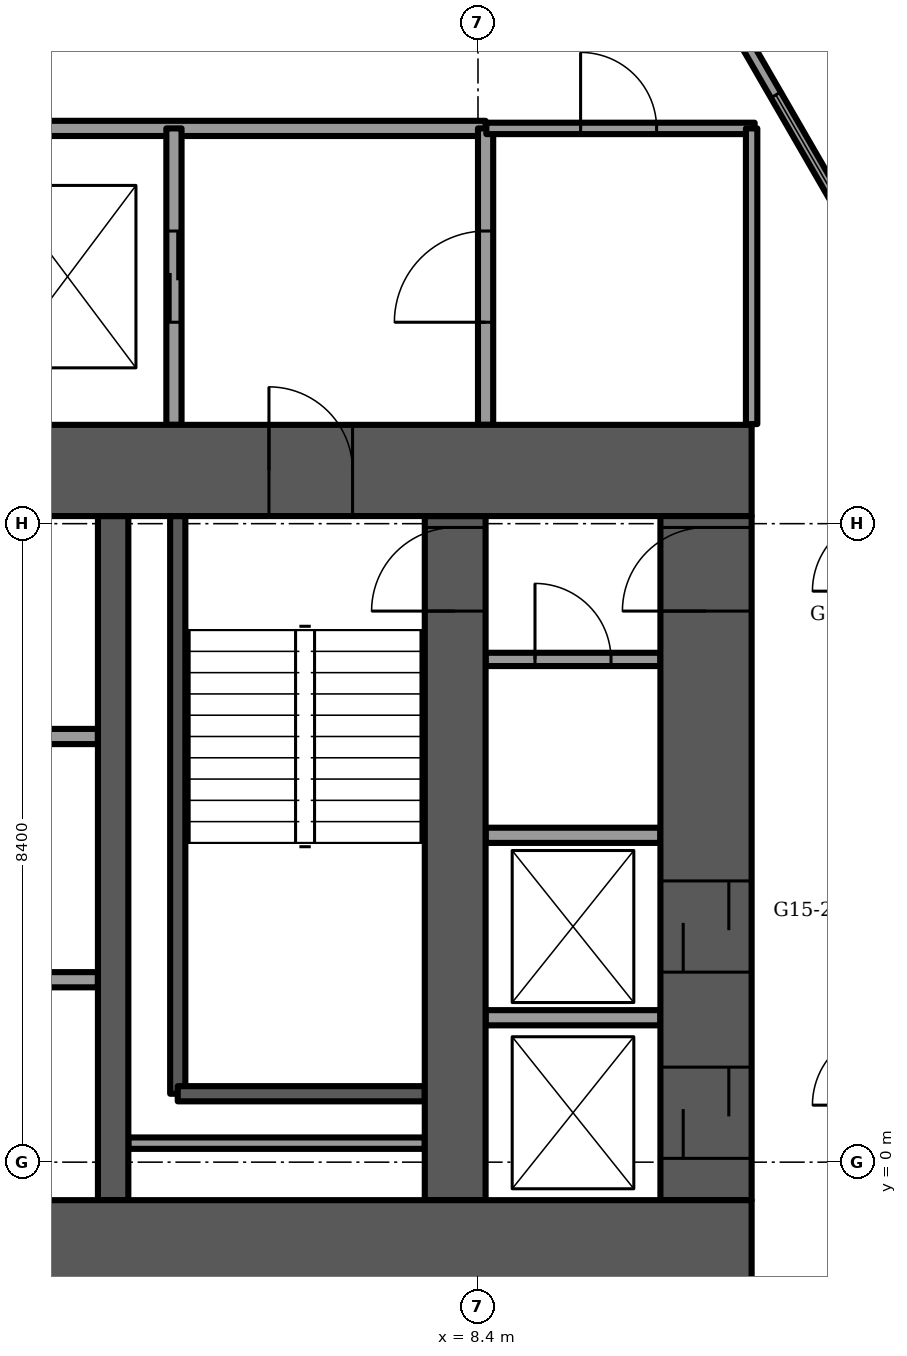
"""IFC4 building model, lengths in metres.
Left out: names, types, materials, properties, quantities, classifications, styles, units other than length and angle.
Written with IfcOpenShell. Run it as: python <this file> out.ifc"""

import sys

from ifc_helpers import new_model, si_unit, direction, frame, frame_2d, origin, place, context, subcontext, project, spatial, rectangle, extrude, element, fill, save


model = new_model("IFC4")
c1 = context("Model", 3, precision=1e-05, world=origin(), true_north=direction((0.0, 1.0)))
c2 = subcontext(c1, "Body", "Model", "MODEL_VIEW")
j1 = project(units=[si_unit("LENGTHUNIT", "METRE"), si_unit("PLANEANGLEUNIT", "RADIAN")], contexts=[c1])
p1 = place(None, origin())
s1 = spatial("IfcSite", under=j1, at=p1, CompositionType="ELEMENT")
p2 = place(p1, origin())
s2 = spatial("IfcBuilding", under=s1, at=p2, CompositionType="ELEMENT")
p3 = place(p2, frame((0.0, 0.0, 61.75)))
s3 = spatial("IfcBuildingStorey", under=s2, at=p3, CompositionType="ELEMENT", Elevation=61.75)
p4 = place(p3, frame((-12.0, -1.1, -0.3), z_axis=(0.0, 0.0, 1.0), x_axis=(1.0, 0.0, 0.0)))
e1 = element("IfcWall", 1, at=p4, inside=s3, PredefinedType="SHEAR", context=c2, shape_type="SweptSolid", body=[
    extrude(rectangle(XDim=24.0, YDim=1.2, at=frame_2d((12.0, 0.0))), origin(), (0.0, 0.0, 1.0), 3.75),
])
p5 = place(p4, frame((11.2, 0.0, 0.0)))
e2 = element("IfcOpeningElement", 2, at=p5, cuts=e1, PredefinedType="OPENING", context=c2, shape_type="SweptSolid", body=[
    extrude(rectangle(XDim=1.6, YDim=2.1, at=frame_2d((0.8, 1.05))), frame((0.0, 0.6, 0.0), z_axis=(0.0, -1.0, 0.0), x_axis=(1.0, 0.0, 0.0)), (0.0, 0.0, 1.0), 1.2),
])
p6 = place(p3, frame((-12.0, 9.1, -0.3), z_axis=(0.0, 0.0, 1.0), x_axis=(1.0, 0.0, 0.0)))
e3 = element("IfcWall", 3, at=p6, inside=s3, PredefinedType="SHEAR", context=c2, shape_type="SweptSolid", body=[
    extrude(rectangle(XDim=24.0, YDim=1.2, at=frame_2d((12.0, 0.0))), origin(), (0.0, 0.0, 1.0), 3.75),
])
p7 = place(p6, frame((11.2, 0.0, 0.0)))
e4 = element("IfcOpeningElement", 4, at=p7, cuts=e3, PredefinedType="OPENING", context=c2, shape_type="SweptSolid", body=[
    extrude(rectangle(XDim=1.6, YDim=2.1, at=frame_2d((0.8, 1.05))), frame((0.0, 0.6, 0.0), z_axis=(0.0, -1.0, 0.0), x_axis=(1.0, 0.0, 0.0)), (0.0, 0.0, 1.0), 1.2),
])
p8 = place(p6, frame((5.25, 0.0, 0.0)))
e5 = element("IfcOpeningElement", 5, at=p8, cuts=e3, PredefinedType="OPENING", context=c2, shape_type="SweptSolid", body=[
    extrude(rectangle(XDim=1.1, YDim=2.1, at=frame_2d((0.55, 1.05))), frame((0.0, 0.6, 0.0), z_axis=(0.0, -1.0, 0.0), x_axis=(1.0, 0.0, 0.0)), (0.0, 0.0, 1.0), 1.2),
])
p9 = place(p6, frame((17.65, 0.0, 0.0)))
e6 = element("IfcOpeningElement", 6, at=p9, cuts=e3, PredefinedType="OPENING", context=c2, shape_type="SweptSolid", body=[
    extrude(rectangle(XDim=1.1, YDim=2.1, at=frame_2d((0.55, 1.05))), frame((0.0, 0.6, 0.0), z_axis=(0.0, -1.0, 0.0), x_axis=(1.0, 0.0, 0.0)), (0.0, 0.0, 1.0), 1.2),
])
p10 = place(p3, frame((8.1, -0.5, -0.3), z_axis=(0.0, 0.0, 1.0), x_axis=(0.0, 1.0, 0.0)))
e7 = element("IfcWall", 7, at=p10, inside=s3, PredefinedType="SHEAR", context=c2, shape_type="SweptSolid", body=[
    extrude(rectangle(XDim=9.0, YDim=0.8, at=frame_2d((4.5, 0.0))), origin(), (0.0, 0.0, 1.0), 3.75),
])
p11 = place(p10, frame((7.75, 0.0, 0.0)))
e8 = element("IfcOpeningElement", 8, at=p11, cuts=e7, PredefinedType="OPENING", context=c2, shape_type="SweptSolid", body=[
    extrude(rectangle(XDim=1.1, YDim=2.1, at=frame_2d((0.55, 1.05))), frame((0.0, 0.4, 0.0), z_axis=(0.0, -1.0, 0.0), x_axis=(1.0, 0.0, 0.0)), (0.0, 0.0, 1.0), 0.8),
])
p12 = place(p3, frame((3.6, -0.5, -0.3), z_axis=(0.0, 0.0, 1.0), x_axis=(0.0, 1.0, 0.0)))
e9 = element("IfcWall", 9, at=p12, inside=s3, PredefinedType="SHEAR", context=c2, shape_type="SweptSolid", body=[
    extrude(rectangle(XDim=9.0, YDim=0.4, at=frame_2d((4.5, 0.0))), origin(), (0.0, 0.0, 1.0), 3.75),
])
p13 = place(p3, frame((11.4, -0.5, -0.3), z_axis=(0.0, 0.0, 1.0), x_axis=(0.0, 1.0, 0.0)))
e10 = element("IfcWall", 10, at=p13, inside=s3, PredefinedType="SHEAR", context=c2, shape_type="SweptSolid", body=[
    extrude(rectangle(XDim=9.0, YDim=1.2, at=frame_2d((4.5, 0.0))), origin(), (0.0, 0.0, 1.0), 3.75),
])
p14 = place(p13, frame((7.75, 0.0, 0.0)))
e11 = element("IfcOpeningElement", 11, at=p14, cuts=e10, PredefinedType="OPENING", context=c2, shape_type="SweptSolid", body=[
    extrude(rectangle(XDim=1.1, YDim=2.1, at=frame_2d((0.55, 1.05))), frame((0.0, 0.6, 0.0), z_axis=(0.0, -1.0, 0.0), x_axis=(1.0, 0.0, 0.0)), (0.0, 0.0, 1.0), 1.2),
])
p15 = place(p13, frame((0.55, 0.0, 0.0)))
e12 = element("IfcOpeningElement", 12, at=p15, cuts=e10, PredefinedType="OPENING", context=c2, shape_type="SweptSolid", body=[
    extrude(rectangle(XDim=1.2, YDim=2.1, at=frame_2d((0.6, 1.05))), frame((0.0, 0.6, 0.0), z_axis=(0.0, -1.0, 0.0), x_axis=(1.0, 0.0, 0.0)), (0.0, 0.0, 1.0), 1.2),
])
p16 = place(p13, frame((3.0, 0.0, 0.0)))
e13 = element("IfcOpeningElement", 13, at=p16, cuts=e10, PredefinedType="OPENING", context=c2, shape_type="SweptSolid", body=[
    extrude(rectangle(XDim=1.2, YDim=2.1, at=frame_2d((0.6, 1.05))), frame((0.0, 0.6, 0.0), z_axis=(0.0, -1.0, 0.0), x_axis=(1.0, 0.0, 0.0)), (0.0, 0.0, 1.0), 1.2),
])
p17 = place(p3, frame((15.419, 14.521, 0.0), z_axis=(0.0, 0.0, 1.0), x_axis=(-0.500013966327, 0.866017340172, 0.0)))
e14 = element("IfcWall", 14, at=p17, inside=s3, PredefinedType="PARAPET", context=c2, shape_type="SweptSolid", body=[
    extrude(rectangle(XDim=7.129, YDim=0.9, at=frame_2d((3.564, 0.0))), origin(), (0.0, 0.0, 1.0), 1.1),
])
p18 = place(p3, frame((11.37, -17.156, 0.0), z_axis=(0.0, 0.0, 1.0), x_axis=(0.499995095024, 0.866028235655, 0.0)))
e15 = element("IfcWall", 15, at=p18, inside=s3, PredefinedType="SOLIDWALL", context=c2, shape_type="SweptSolid", body=[
    extrude(rectangle(XDim=18.345, YDim=0.15, at=frame_2d((9.172, 0.0))), origin(), (0.0, 0.0, 1.0), 3.45),
])
p19 = place(p18, frame((1.073, 0.0, 0.15)))
e16 = element("IfcOpeningElement", 16, at=p19, cuts=e15, PredefinedType="OPENING", context=c2, shape_type="SweptSolid", body=[
    extrude(rectangle(XDim=1.8, YDim=2.85, at=frame_2d((0.9, 1.425))), frame((0.0, 0.075, 0.0), z_axis=(0.0, -1.0, 0.0), x_axis=(1.0, 0.0, 0.0)), (0.0, 0.0, 1.0), 0.15),
])
p20 = place(p18, frame((3.172, 0.0, 0.0)))
e17 = element("IfcOpeningElement", 17, at=p20, cuts=e15, PredefinedType="OPENING", context=c2, shape_type="SweptSolid", body=[
    extrude(rectangle(XDim=1.5, YDim=2.4, at=frame_2d((0.75, 1.2))), frame((0.0, 0.075, 0.0), z_axis=(0.0, -1.0, 0.0), x_axis=(1.0, 0.0, 0.0)), (0.0, 0.0, 1.0), 0.15),
])
p21 = place(p18, frame((5.272, 0.0, 0.15)))
e18 = element("IfcOpeningElement", 18, at=p21, cuts=e15, PredefinedType="OPENING", context=c2, shape_type="SweptSolid", body=[
    extrude(rectangle(XDim=1.8, YDim=2.85, at=frame_2d((0.9, 1.425))), frame((0.0, 0.075, 0.0), z_axis=(0.0, -1.0, 0.0), x_axis=(1.0, 0.0, 0.0)), (0.0, 0.0, 1.0), 0.15),
])
p22 = place(p18, frame((7.372, 0.0, 0.0)))
e19 = element("IfcOpeningElement", 19, at=p22, cuts=e15, PredefinedType="OPENING", context=c2, shape_type="SweptSolid", body=[
    extrude(rectangle(XDim=1.5, YDim=2.4, at=frame_2d((0.75, 1.2))), frame((0.0, 0.075, 0.0), z_axis=(0.0, -1.0, 0.0), x_axis=(1.0, 0.0, 0.0)), (0.0, 0.0, 1.0), 0.15),
])
p23 = place(p18, frame((9.472, 0.0, 0.15)))
e20 = element("IfcOpeningElement", 20, at=p23, cuts=e15, PredefinedType="OPENING", context=c2, shape_type="SweptSolid", body=[
    extrude(rectangle(XDim=1.8, YDim=2.85, at=frame_2d((0.9, 1.425))), frame((0.0, 0.075, 0.0), z_axis=(0.0, -1.0, 0.0), x_axis=(1.0, 0.0, 0.0)), (0.0, 0.0, 1.0), 0.15),
])
p24 = place(p18, frame((11.573, 0.0, 0.0)))
e21 = element("IfcOpeningElement", 21, at=p24, cuts=e15, PredefinedType="OPENING", context=c2, shape_type="SweptSolid", body=[
    extrude(rectangle(XDim=1.5, YDim=2.4, at=frame_2d((0.75, 1.2))), frame((0.0, 0.075, 0.0), z_axis=(0.0, -1.0, 0.0), x_axis=(1.0, 0.0, 0.0)), (0.0, 0.0, 1.0), 0.15),
])
p25 = place(p18, frame((13.672, 0.0, 0.15)))
e22 = element("IfcOpeningElement", 22, at=p25, cuts=e15, PredefinedType="OPENING", context=c2, shape_type="SweptSolid", body=[
    extrude(rectangle(XDim=0.9, YDim=2.85, at=frame_2d((0.45, 1.425))), frame((0.0, 0.075, 0.0), z_axis=(0.0, -1.0, 0.0), x_axis=(1.0, 0.0, 0.0)), (0.0, 0.0, 1.0), 0.15),
])
p26 = place(p3, frame((20.543, -0.204, 0.0), z_axis=(0.0, 0.0, 1.0), x_axis=(-0.500005515081, 0.866022219628, 0.0)))
e23 = element("IfcWall", 23, at=p26, inside=s3, PredefinedType="SOLIDWALL", context=c2, shape_type="SweptSolid", body=[
    extrude(rectangle(XDim=23.667, YDim=0.15, at=frame_2d((11.833, 0.0))), origin(), (0.0, 0.0, 1.0), 3.45),
])
p27 = place(p26, frame((6.548, 0.0, 0.15)))
e24 = element("IfcOpeningElement", 24, at=p27, cuts=e23, PredefinedType="OPENING", context=c2, shape_type="SweptSolid", body=[
    extrude(rectangle(XDim=1.5, YDim=2.85, at=frame_2d((0.75, 1.425))), frame((0.0, 0.075, 0.0), z_axis=(0.0, -1.0, 0.0), x_axis=(1.0, 0.0, 0.0)), (0.0, 0.0, 1.0), 0.15),
])
p28 = place(p26, frame((8.648, 0.0, 0.15)))
e25 = element("IfcOpeningElement", 25, at=p28, cuts=e23, PredefinedType="OPENING", context=c2, shape_type="SweptSolid", body=[
    extrude(rectangle(XDim=1.8, YDim=2.85, at=frame_2d((0.9, 1.425))), frame((0.0, 0.075, 0.0), z_axis=(0.0, -1.0, 0.0), x_axis=(1.0, 0.0, 0.0)), (0.0, 0.0, 1.0), 0.15),
])
p29 = place(p26, frame((10.748, 0.0, 0.15)))
e26 = element("IfcOpeningElement", 26, at=p29, cuts=e23, PredefinedType="OPENING", context=c2, shape_type="SweptSolid", body=[
    extrude(rectangle(XDim=1.5, YDim=2.85, at=frame_2d((0.75, 1.425))), frame((0.0, 0.075, 0.0), z_axis=(0.0, -1.0, 0.0), x_axis=(1.0, 0.0, 0.0)), (0.0, 0.0, 1.0), 0.15),
])
p30 = place(p26, frame((13.914, 0.0, 0.15)))
e27 = element("IfcOpeningElement", 27, at=p30, cuts=e23, PredefinedType="OPENING", context=c2, shape_type="SweptSolid", body=[
    extrude(rectangle(XDim=0.9, YDim=2.85, at=frame_2d((0.45, 1.425))), frame((0.0, 0.075, 0.0), z_axis=(0.0, -1.0, 0.0), x_axis=(1.0, 0.0, 0.0)), (0.0, 0.0, 1.0), 0.15),
])
p31 = place(p26, frame((14.948, 0.0, 0.15)))
e28 = element("IfcOpeningElement", 28, at=p31, cuts=e23, PredefinedType="OPENING", context=c2, shape_type="SweptSolid", body=[
    extrude(rectangle(XDim=1.5, YDim=2.85, at=frame_2d((0.75, 1.425))), frame((0.0, 0.075, 0.0), z_axis=(0.0, -1.0, 0.0), x_axis=(1.0, 0.0, 0.0)), (0.0, 0.0, 1.0), 0.15),
])
p32 = place(p26, frame((19.148, 0.0, 0.0)))
e29 = element("IfcOpeningElement", 29, at=p32, cuts=e23, PredefinedType="OPENING", context=c2, shape_type="SweptSolid", body=[
    extrude(rectangle(XDim=1.5, YDim=2.4, at=frame_2d((0.75, 1.2))), frame((0.0, 0.075, 0.0), z_axis=(0.0, -1.0, 0.0), x_axis=(1.0, 0.0, 0.0)), (0.0, 0.0, 1.0), 0.15),
])
p33 = place(p26, frame((1.617, 0.0, 0.15)))
e30 = element("IfcOpeningElement", 30, at=p33, cuts=e23, PredefinedType="OPENING", context=c2, shape_type="SweptSolid", body=[
    extrude(rectangle(XDim=1.8, YDim=2.73, at=frame_2d((0.9, 1.365))), frame((0.0, 0.075, 0.0), z_axis=(0.0, -1.0, 0.0), x_axis=(1.0, 0.0, 0.0)), (0.0, 0.0, 1.0), 0.15),
])
p34 = place(p26, frame((21.458, 0.0, 0.15)))
e31 = element("IfcOpeningElement", 31, at=p34, cuts=e23, PredefinedType="OPENING", context=c2, shape_type="SweptSolid", body=[
    extrude(rectangle(XDim=1.8, YDim=2.73, at=frame_2d((0.9, 1.365))), frame((0.0, 0.075, 0.0), z_axis=(0.0, -1.0, 0.0), x_axis=(1.0, 0.0, 0.0)), (0.0, 0.0, 1.0), 0.15),
])
for number, where, z_axis, x_axis in (
    (32, (1.1, 2.4, 0.0), (0.0, 0.0, 1.0), (1.0, 0.0, 0.0)),
    (33, (1.1, 5.6, 0.0), (0.0, 0.0, 1.0), (1.0, 0.0, 0.0)),
):
    element("IfcWall", number, at=place(p3, frame(where, z_axis=z_axis, x_axis=x_axis)), inside=s3, PredefinedType="PARTITIONING", context=c2, shape_type="SweptSolid", body=[
        extrude(rectangle(XDim=2.3, YDim=0.2, at=frame_2d((1.15, 0.0))), origin(), (0.0, 0.0, 1.0), 3.45),
    ])
p35 = place(p3, frame((4.45, 0.9, -0.3), z_axis=(0.0, 0.0, 1.0), x_axis=(0.0, 1.0, 0.0)))
e34 = element("IfcWall", 34, at=p35, inside=s3, PredefinedType="SOLIDWALL", context=c2, shape_type="SweptSolid", body=[
    extrude(rectangle(XDim=7.6, YDim=0.2, at=frame_2d((3.8, 0.0))), origin(), (0.0, 0.0, 1.0), 3.75),
])
p36 = place(p3, frame((4.45, 0.9, -0.3), z_axis=(0.0, 0.0, 1.0), x_axis=(1.0, 0.0, 0.0)))
e35 = element("IfcWall", 35, at=p36, inside=s3, PredefinedType="SOLIDWALL", context=c2, shape_type="SweptSolid", body=[
    extrude(rectangle(XDim=3.25, YDim=0.2, at=frame_2d((1.625, 0.0))), origin(), (0.0, 0.0, 1.0), 3.75),
])
p37 = place(p3, frame((3.8, 0.25, 0.0), z_axis=(0.0, 0.0, 1.0), x_axis=(1.0, 0.0, 0.0)))
e36 = element("IfcWall", 36, at=p37, inside=s3, PredefinedType="PARTITIONING", context=c2, shape_type="SweptSolid", body=[
    extrude(rectangle(XDim=3.9, YDim=0.15, at=frame_2d((1.95, 0.0))), origin(), (0.0, 0.0, 1.0), 3.45),
])
p38 = place(p3, frame((-8.5, 13.6, 0.0), z_axis=(0.0, 0.0, 1.0), x_axis=(1.0, 0.0, 0.0)))
e37 = element("IfcWall", 37, at=p38, inside=s3, PredefinedType="PARTITIONING", context=c2, shape_type="SweptSolid", body=[
    extrude(rectangle(XDim=17.0, YDim=0.2, at=frame_2d((8.5, 0.0))), origin(), (0.0, 0.0, 1.0), 3.45),
])
p39 = place(p38, frame((8.0, 0.0, 0.0)))
e38 = element("IfcOpeningElement", 38, at=p39, cuts=e37, PredefinedType="OPENING", context=c2, shape_type="SweptSolid", body=[
    extrude(rectangle(XDim=1.0, YDim=2.1, at=frame_2d((0.5, 1.05))), frame((0.0, 0.1, 0.0), z_axis=(0.0, -1.0, 0.0), x_axis=(1.0, 0.0, 0.0)), (0.0, 0.0, 1.0), 0.2),
])
p40 = place(p3, frame((8.5, 9.7, 0.0), z_axis=(0.0, 0.0, 1.0), x_axis=(0.0, 1.0, 0.0)))
e39 = element("IfcWall", 39, at=p40, inside=s3, PredefinedType="PARTITIONING", context=c2, shape_type="SweptSolid", body=[
    extrude(rectangle(XDim=3.9, YDim=0.2, at=frame_2d((1.95, 0.0))), origin(), (0.0, 0.0, 1.0), 3.45),
])
p41 = place(p40, frame((1.35, 0.0, 0.0)))
e40 = element("IfcOpeningElement", 40, at=p41, cuts=e39, PredefinedType="OPENING", context=c2, shape_type="SweptSolid", body=[
    extrude(rectangle(XDim=1.2, YDim=2.1, at=frame_2d((0.6, 1.05))), frame((0.0, 0.1, 0.0), z_axis=(0.0, -1.0, 0.0), x_axis=(1.0, 0.0, 0.0)), (0.0, 0.0, 1.0), 0.2),
])
p42 = place(p3, frame((4.4, 9.7, 0.0), z_axis=(0.0, 0.0, 1.0), x_axis=(0.0, 1.0, 0.0)))
e41 = element("IfcWall", 41, at=p42, inside=s3, PredefinedType="PARTITIONING", context=c2, shape_type="SweptSolid", body=[
    extrude(rectangle(XDim=3.9, YDim=0.2, at=frame_2d((1.95, 0.0))), origin(), (0.0, 0.0, 1.0), 3.45),
])
p43 = place(p42, frame((1.35, 0.0, 0.0)))
e42 = element("IfcOpeningElement", 42, at=p43, cuts=e41, PredefinedType="OPENING", context=c2, shape_type="SweptSolid", body=[
    extrude(rectangle(XDim=1.2, YDim=2.1, at=frame_2d((0.6, 1.05))), frame((0.0, 0.1, 0.0), z_axis=(0.0, -1.0, 0.0), x_axis=(1.0, 0.0, 0.0)), (0.0, 0.0, 1.0), 0.2),
])
for number, where, z_axis, x_axis in (
    (43, (8.5, 1.9, 0.0), (0.0, 0.0, 1.0), (1.0, 0.0, 0.0)),
    (44, (8.5, 4.3, 0.0), (0.0, 0.0, 1.0), (1.0, 0.0, 0.0)),
):
    element("IfcWall", number, at=place(p3, frame(where, z_axis=z_axis, x_axis=x_axis)), inside=s3, PredefinedType="PARTITIONING", context=c2, shape_type="SweptSolid", body=[
        extrude(rectangle(XDim=2.3, YDim=0.2, at=frame_2d((1.15, 0.0))), origin(), (0.0, 0.0, 1.0), 3.45),
    ])
p44 = place(p3, frame((8.5, 6.614, 0.0), z_axis=(0.0, 0.0, 1.0), x_axis=(1.0, 0.0, 0.0)))
e45 = element("IfcWall", 45, at=p44, inside=s3, PredefinedType="PARTITIONING", context=c2, shape_type="SweptSolid", body=[
    extrude(rectangle(XDim=2.3, YDim=0.175, at=frame_2d((1.15, 0.0))), origin(), (0.0, 0.0, 1.0), 3.45),
])
p45 = place(p44, frame((0.65, 0.0, 0.0)))
e46 = element("IfcOpeningElement", 46, at=p45, cuts=e45, PredefinedType="OPENING", context=c2, shape_type="SweptSolid", body=[
    extrude(rectangle(XDim=1.0, YDim=2.1, at=frame_2d((0.5, 1.05))), frame((0.0, 0.087, 0.0), z_axis=(0.0, -1.0, 0.0), x_axis=(1.0, 0.0, 0.0)), (0.0, 0.0, 1.0), 0.175),
])
p46 = place(p3, frame((8.51, 13.6, 0.0), z_axis=(0.0, 0.0, 1.0), x_axis=(1.0, 0.0, 0.0)))
e47 = element("IfcWall", 47, at=p46, inside=s3, PredefinedType="PARTITIONING", context=c2, shape_type="SweptSolid", body=[
    extrude(rectangle(XDim=3.53, YDim=0.15, at=frame_2d((1.765, 0.0))), origin(), (0.0, 0.0, 1.0), 3.45),
])
p47 = place(p46, frame((1.24, 0.0, 0.0)))
e48 = element("IfcOpeningElement", 48, at=p47, cuts=e47, PredefinedType="OPENING", context=c2, shape_type="SweptSolid", body=[
    extrude(rectangle(XDim=1.0, YDim=2.1, at=frame_2d((0.5, 1.05))), frame((0.0, 0.075, 0.0), z_axis=(0.0, -1.0, 0.0), x_axis=(1.0, 0.0, 0.0)), (0.0, 0.0, 1.0), 0.15),
])
p48 = place(p3, frame((12.0, 9.71, 0.0), z_axis=(0.0, 0.0, 1.0), x_axis=(0.0, 1.0, 0.0)))
e49 = element("IfcWall", 49, at=p48, inside=s3, PredefinedType="PARTITIONING", context=c2, shape_type="SweptSolid", body=[
    extrude(rectangle(XDim=3.89, YDim=0.15, at=frame_2d((1.945, 0.0))), origin(), (0.0, 0.0, 1.0), 3.45),
])
p49 = place(p31, origin())
e50 = element("IfcWindow", 50, at=p49, inside=s3, PartitioningType="SINGLE_PANEL", PredefinedType="WINDOW", context=c2, shape_type="SweptSolid", body=[
    extrude(rectangle(XDim=1.5, YDim=2.85, at=frame_2d((0.75, 1.425))), frame((0.0, 0.03, 0.0), z_axis=(0.0, -1.0, 0.0), x_axis=(1.0, 0.0, 0.0)), (0.0, 0.0, 1.0), 0.06),
])
fill(e28, e50)
p50 = place(p9, origin())
e51 = element("IfcDoor", 51, at=p50, inside=s3, OperationType="SINGLE_SWING_RIGHT", PredefinedType="DOOR", context=c2, shape_type="SweptSolid", body=[
    extrude(rectangle(XDim=1.1, YDim=2.1, at=frame_2d((0.55, 1.05))), frame((0.0, 0.025, 0.0), z_axis=(0.0, -1.0, 0.0), x_axis=(1.0, 0.0, 0.0)), (0.0, 0.0, 1.0), 0.05),
])
fill(e6, e51)
p51 = place(p11, origin())
e52 = element("IfcDoor", 52, at=p51, inside=s3, OperationType="SINGLE_SWING_LEFT", PredefinedType="DOOR", context=c2, shape_type="SweptSolid", body=[
    extrude(rectangle(XDim=1.1, YDim=2.1, at=frame_2d((0.55, 1.05))), frame((0.0, 0.025, 0.0), z_axis=(0.0, -1.0, 0.0), x_axis=(1.0, 0.0, 0.0)), (0.0, 0.0, 1.0), 0.05),
])
fill(e8, e52)
p52 = place(p43, origin())
e53 = element("IfcDoor", 53, at=p52, inside=s3, OperationType="SLIDING_TO_LEFT", PredefinedType="DOOR", context=c2, shape_type="SweptSolid", body=[
    extrude(rectangle(XDim=1.2, YDim=2.1, at=frame_2d((0.6, 1.05))), frame((0.0, 0.025, 0.0), z_axis=(0.0, -1.0, 0.0), x_axis=(1.0, 0.0, 0.0)), (0.0, 0.0, 1.0), 0.05),
])
fill(e42, e53)
p53 = place(p41, origin())
e54 = element("IfcDoor", 54, at=p53, inside=s3, OperationType="SINGLE_SWING_LEFT", PredefinedType="DOOR", context=c2, shape_type="SweptSolid", body=[
    extrude(rectangle(XDim=1.2, YDim=2.1, at=frame_2d((0.6, 1.05))), frame((0.0, 0.025, 0.0), z_axis=(0.0, -1.0, 0.0), x_axis=(1.0, 0.0, 0.0)), (0.0, 0.0, 1.0), 0.05),
])
fill(e40, e54)
p54 = place(p45, origin())
e55 = element("IfcDoor", 55, at=p54, inside=s3, OperationType="SINGLE_SWING_RIGHT", PredefinedType="DOOR", context=c2, shape_type="SweptSolid", body=[
    extrude(rectangle(XDim=1.0, YDim=2.1, at=frame_2d((0.5, 1.05))), frame((0.0, 0.025, 0.0), z_axis=(0.0, -1.0, 0.0), x_axis=(1.0, 0.0, 0.0)), (0.0, 0.0, 1.0), 0.05),
])
fill(e46, e55)
p55 = place(p14, origin())
e56 = element("IfcDoor", 56, at=p55, inside=s3, OperationType="SINGLE_SWING_RIGHT", PredefinedType="DOOR", context=c2, shape_type="SweptSolid", body=[
    extrude(rectangle(XDim=1.1, YDim=2.1, at=frame_2d((0.55, 1.05))), frame((0.0, 0.025, 0.0), z_axis=(0.0, -1.0, 0.0), x_axis=(1.0, 0.0, 0.0)), (0.0, 0.0, 1.0), 0.05),
])
fill(e11, e56)
p56 = place(p15, origin())
e57 = element("IfcDoor", 57, at=p56, inside=s3, OperationType="SLIDING_TO_LEFT", PredefinedType="DOOR", context=c2, shape_type="SweptSolid", body=[
    extrude(rectangle(XDim=1.2, YDim=2.1, at=frame_2d((0.6, 1.05))), frame((0.0, 0.025, 0.0), z_axis=(0.0, -1.0, 0.0), x_axis=(1.0, 0.0, 0.0)), (0.0, 0.0, 1.0), 0.05),
])
fill(e12, e57)
p57 = place(p16, origin())
e58 = element("IfcDoor", 58, at=p57, inside=s3, OperationType="SLIDING_TO_LEFT", PredefinedType="DOOR", context=c2, shape_type="SweptSolid", body=[
    extrude(rectangle(XDim=1.2, YDim=2.1, at=frame_2d((0.6, 1.05))), frame((0.0, 0.025, 0.0), z_axis=(0.0, -1.0, 0.0), x_axis=(1.0, 0.0, 0.0)), (0.0, 0.0, 1.0), 0.05),
])
fill(e13, e58)
p58 = place(p47, origin())
e59 = element("IfcDoor", 59, at=p58, inside=s3, OperationType="SINGLE_SWING_LEFT", PredefinedType="DOOR", context=c2, shape_type="SweptSolid", body=[
    extrude(rectangle(XDim=1.0, YDim=2.1, at=frame_2d((0.5, 1.05))), frame((0.0, 0.025, 0.0), z_axis=(0.0, -1.0, 0.0), x_axis=(1.0, 0.0, 0.0)), (0.0, 0.0, 1.0), 0.05),
])
fill(e48, e59)
save(model, sys.argv[1])
